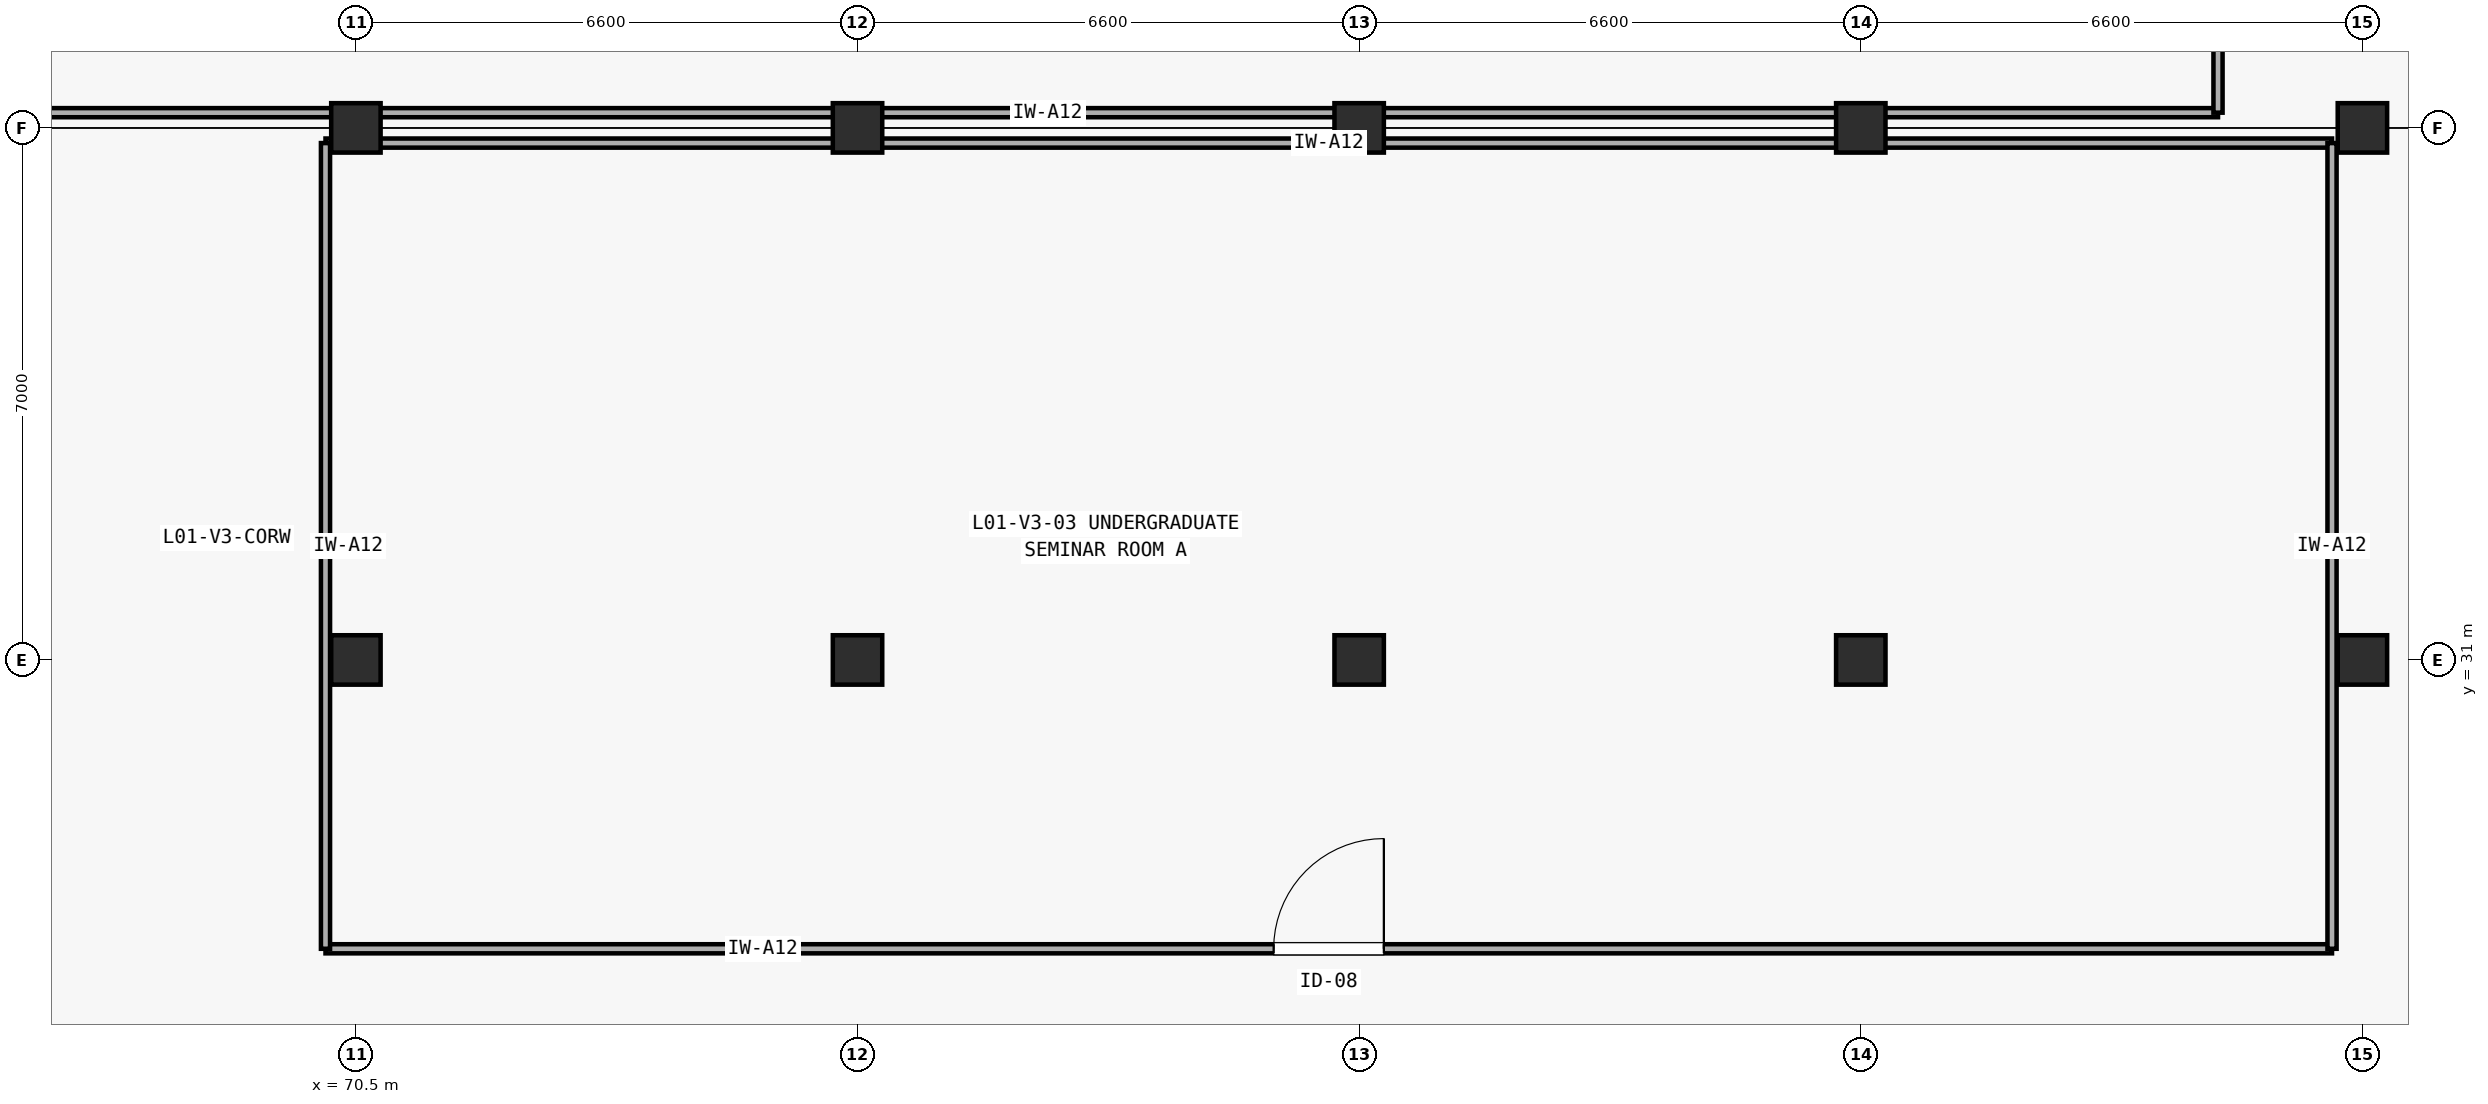
"""IFC4 building model, lengths in metres.
Left out: names, types, materials, properties, quantities, classifications, styles, units other than length and angle.
Written with IfcOpenShell. Run it as: python <this file> out.ifc"""

import sys

from ifc_helpers import new_model, si_unit, direction, frame, frame_2d, origin, origin_2d, place, context, subcontext, project, spatial, rectangle, extrude, element, fill, save


model = new_model("IFC4")
c1 = context("Model", 3, precision=1e-05, world=origin(), true_north=direction((0.0, 1.0)))
c2 = subcontext(c1, "Body", "Model", "MODEL_VIEW")
j1 = project(units=[si_unit("LENGTHUNIT", "METRE"), si_unit("PLANEANGLEUNIT", "RADIAN")], contexts=[c1])
p1 = place(None, origin())
s1 = spatial("IfcSite", under=j1, at=p1, CompositionType="ELEMENT")
p2 = place(p1, origin())
s2 = spatial("IfcBuilding", under=s1, at=p2, CompositionType="ELEMENT")
p3 = place(p2, frame((0.0, 0.0, 4.2)))
s3 = spatial("IfcBuildingStorey", under=s2, at=p3, CompositionType="ELEMENT", Elevation=4.2)
for number, where, z_axis, x_axis in (
    (1, (70.5, 31.0, 0.0), (0.0, 0.0, 1.0), (1.0, 0.0, 0.0)),
    (2, (70.5, 38.0, 0.0), (0.0, 0.0, 1.0), (1.0, 0.0, 0.0)),
    (3, (77.1, 31.0, 0.0), (0.0, 0.0, 1.0), (1.0, 0.0, 0.0)),
    (4, (77.1, 38.0, 0.0), (0.0, 0.0, 1.0), (1.0, 0.0, 0.0)),
    (5, (83.7, 31.0, 0.0), (0.0, 0.0, 1.0), (1.0, 0.0, 0.0)),
    (6, (83.7, 38.0, 0.0), (0.0, 0.0, 1.0), (1.0, 0.0, 0.0)),
    (7, (90.3, 31.0, 0.0), (0.0, 0.0, 1.0), (1.0, 0.0, 0.0)),
    (8, (90.3, 38.0, 0.0), (0.0, 0.0, 1.0), (1.0, 0.0, 0.0)),
    (9, (96.9, 31.0, 0.0), (0.0, 0.0, 1.0), (1.0, 0.0, 0.0)),
    (10, (96.9, 38.0, 0.0), (0.0, 0.0, 1.0), (1.0, 0.0, 0.0)),
):
    element("IfcColumn", number, at=place(p3, frame(where, z_axis=z_axis, x_axis=x_axis)), inside=s3, PredefinedType="COLUMN", context=c2, shape_type="SweptSolid", body=[
        extrude(rectangle(XDim=0.65, YDim=0.65, at=origin_2d()), origin(), (0.0, 0.0, 1.0), 4.2),
    ])
p4 = place(p3, frame((70.1, 27.2, 0.0), z_axis=(0.0, 0.0, 1.0), x_axis=(1.0, 0.0, 0.0)))
e11 = element("IfcWall", 11, at=p4, inside=s3, PredefinedType="PARTITIONING", context=c2, shape_type="SweptSolid", body=[
    extrude(rectangle(XDim=26.4, YDim=0.12, at=frame_2d((13.2, 0.0))), origin(), (0.0, 0.0, 1.0), 3.9),
])
p5 = place(p4, frame((12.475, 0.0, 0.0)))
e12 = element("IfcOpeningElement", 12, at=p5, cuts=e11, PredefinedType="OPENING", context=c2, shape_type="SweptSolid", body=[
    extrude(rectangle(XDim=1.45, YDim=2.2, at=frame_2d((0.725, 1.1))), frame((0.0, 0.07, 0.0), z_axis=(0.0, -1.0, 0.0), x_axis=(1.0, 0.0, 0.0)), (0.0, 0.0, 1.0), 0.14),
])
p6 = place(p3, frame((70.1, 37.8, 0.0), z_axis=(0.0, 0.0, 1.0), x_axis=(1.0, 0.0, 0.0)))
e13 = element("IfcWall", 13, at=p6, inside=s3, PredefinedType="PARTITIONING", context=c2, shape_type="SweptSolid", body=[
    extrude(rectangle(XDim=26.4, YDim=0.12, at=frame_2d((13.2, 0.0))), origin(), (0.0, 0.0, 1.0), 3.135),
])
for number, where, z_axis, x_axis in (
    (14, (70.1, 27.2, 0.0), (0.0, 0.0, 1.0), (0.0, 1.0, 0.0)),
    (15, (96.5, 27.2, 0.0), (0.0, 0.0, 1.0), (0.0, 1.0, 0.0)),
):
    element("IfcWall", number, at=place(p3, frame(where, z_axis=z_axis, x_axis=x_axis)), inside=s3, PredefinedType="PARTITIONING", context=c2, shape_type="SweptSolid", body=[
        extrude(rectangle(XDim=10.6, YDim=0.12, at=frame_2d((5.3, 0.0))), origin(), (0.0, 0.0, 1.0), 3.9),
    ])
p7 = place(p3, frame((64.2, 38.2, 0.0), z_axis=(0.0, 0.0, 1.0), x_axis=(1.0, 0.0, 0.0)))
e16 = element("IfcWall", 16, at=p7, inside=s3, PredefinedType="PARTITIONING", context=c2, shape_type="SweptSolid", body=[
    extrude(rectangle(XDim=30.8, YDim=0.12, at=frame_2d((15.4, 0.0))), origin(), (0.0, 0.0, 1.0), 3.135),
])
p8 = place(p3, frame((95.0, 38.2, 0.0), z_axis=(0.0, 0.0, 1.0), x_axis=(0.0, 1.0, 0.0)))
e17 = element("IfcWall", 17, at=p8, inside=s3, PredefinedType="PARTITIONING", context=c2, shape_type="SweptSolid", body=[
    extrude(rectangle(XDim=11.1, YDim=0.12, at=frame_2d((5.55, 0.0))), origin(), (0.0, 0.0, 1.0), 3.9),
])
p9 = place(p5, origin())
e18 = element("IfcDoor", 18, at=p9, inside=s3, OperationType="SINGLE_SWING_RIGHT", PredefinedType="DOOR", context=c2, shape_type="SweptSolid", body=[
    extrude(rectangle(XDim=1.45, YDim=2.2, at=frame_2d((0.725, 1.1))), frame((0.0, 0.025, 0.0), z_axis=(0.0, -1.0, 0.0), x_axis=(1.0, 0.0, 0.0)), (0.0, 0.0, 1.0), 0.05),
])
fill(e12, e18)
save(model, sys.argv[1])
